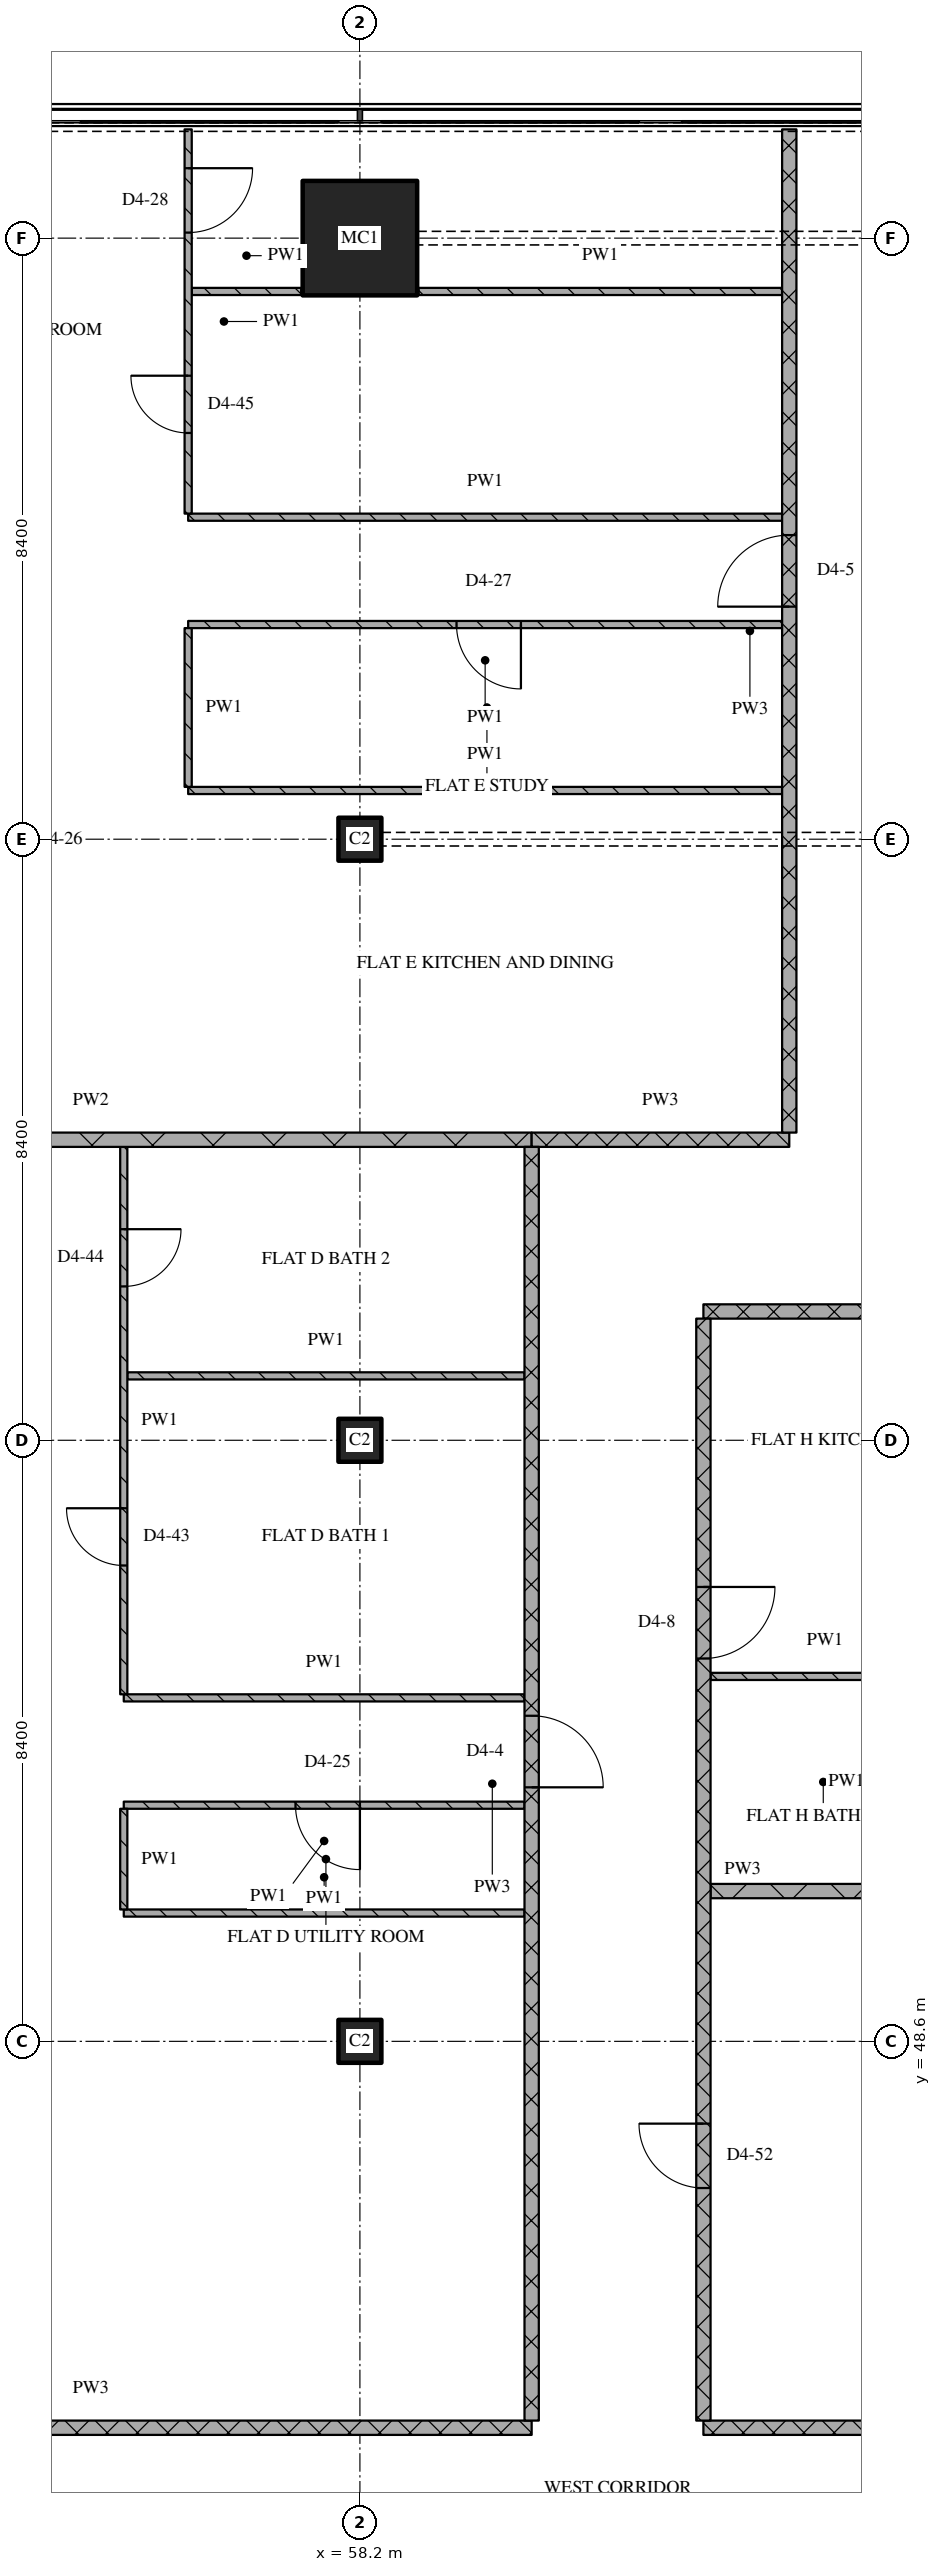
"""IFC4 building model, lengths in metres.
Left out: names, types, materials, properties, quantities, classifications, styles, units other than length and angle.
Written with IfcOpenShell. Run it as: python <this file> out.ifc"""

import sys

from ifc_helpers import new_model, si_unit, direction, frame, frame_2d, origin, origin_2d, place, context, subcontext, project, spatial, rectangle, extrude, element, fill, save


model = new_model("IFC4")
c1 = context("Model", 3, precision=1e-05, world=origin(), true_north=direction((0.0, 1.0)))
c2 = subcontext(c1, "Body", "Model", "MODEL_VIEW")
j1 = project(units=[si_unit("LENGTHUNIT", "METRE"), si_unit("PLANEANGLEUNIT", "RADIAN")], contexts=[c1])
p1 = place(None, origin())
s1 = spatial("IfcSite", under=j1, at=p1, CompositionType="ELEMENT")
p2 = place(p1, origin())
s2 = spatial("IfcBuilding", under=s1, at=p2, CompositionType="ELEMENT")
p3 = place(p2, frame((0.0, 0.0, 237.9)))
s3 = spatial("IfcBuildingStorey", under=s2, at=p3, CompositionType="ELEMENT", Elevation=237.9)
for number, where, z_axis, x_axis in (
    (1, (58.2, 48.6, 0.0), (0.0, 0.0, 1.0), (1.0, 0.0, 0.0)),
    (2, (58.2, 57.0, 0.0), (0.0, 0.0, 1.0), (1.0, 0.0, 0.0)),
    (3, (58.2, 65.4, 0.0), (0.0, 0.0, 1.0), (1.0, 0.0, 0.0)),
):
    element("IfcColumn", number, at=place(p3, frame(where, z_axis=z_axis, x_axis=x_axis)), inside=s3, PredefinedType="COLUMN", context=c2, shape_type="SweptSolid", body=[
        extrude(rectangle(XDim=0.6, YDim=0.6, at=origin_2d()), origin(), (0.0, 0.0, 1.0), 3.6),
    ])
p4 = place(p3, frame((58.2, 73.8, 0.0), z_axis=(0.0, 0.0, 1.0), x_axis=(1.0, 0.0, 0.0)))
e4 = element("IfcColumn", 4, at=p4, inside=s3, PredefinedType="COLUMN", context=c2, shape_type="SweptSolid", body=[
    extrude(rectangle(XDim=1.6, YDim=1.6, at=origin_2d()), origin(), (0.0, 0.0, 1.0), 3.6),
])
p5 = place(p3, frame((48.28, 43.2, 0.0), z_axis=(0.0, 0.0, 1.0), x_axis=(1.0, 0.0, 0.0)))
e5 = element("IfcWall", 5, at=p5, inside=s3, PredefinedType="PARTITIONING", context=c2, shape_type="SweptSolid", body=[
    extrude(rectangle(XDim=12.32, YDim=0.2, at=frame_2d((6.16, 0.0))), origin(), (0.0, 0.0, 1.0), 3.32),
])
p6 = place(p3, frame((63.0, 43.2, 0.0), z_axis=(0.0, 0.0, 1.0), x_axis=(1.0, 0.0, 0.0)))
e6 = element("IfcWall", 6, at=p6, inside=s3, PredefinedType="PARTITIONING", context=c2, shape_type="SweptSolid", body=[
    extrude(rectangle(XDim=5.2, YDim=0.2, at=frame_2d((2.6, 0.0))), origin(), (0.0, 0.0, 1.0), 3.32),
])
p7 = place(p3, frame((54.9, 50.393, 0.0), z_axis=(0.0, 0.0, 1.0), x_axis=(1.0, 0.0, 0.0)))
e7 = element("IfcWall", 7, at=p7, inside=s3, PredefinedType="PARTITIONING", context=c2, shape_type="SweptSolid", body=[
    extrude(rectangle(XDim=5.6, YDim=0.1, at=frame_2d((2.8, 0.0))), origin(), (0.0, 0.0, 1.0), 3.32),
])
p8 = place(p3, frame((63.1, 50.7, 0.0), z_axis=(0.0, 0.0, 1.0), x_axis=(1.0, 0.0, 0.0)))
e8 = element("IfcWall", 8, at=p8, inside=s3, PredefinedType="PARTITIONING", context=c2, shape_type="SweptSolid", body=[
    extrude(rectangle(XDim=5.1, YDim=0.2, at=frame_2d((2.55, 0.0))), origin(), (0.0, 0.0, 1.0), 3.32),
])
p9 = place(p3, frame((60.5, 51.9, 0.0), z_axis=(0.0, 0.0, 1.0), x_axis=(-1.0, 0.0, 0.0)))
e9 = element("IfcWall", 9, at=p9, inside=s3, PredefinedType="PARTITIONING", context=c2, shape_type="SweptSolid", body=[
    extrude(rectangle(XDim=5.6, YDim=0.1, at=frame_2d((2.8, 0.0))), origin(), (0.0, 0.0, 1.0), 3.32),
])
p10 = place(p9, frame((2.3, 0.0, 0.0)))
e10 = element("IfcOpeningElement", 10, at=p10, cuts=e9, PredefinedType="OPENING", context=c2, shape_type="SweptSolid", body=[
    extrude(rectangle(XDim=0.9, YDim=2.1, at=frame_2d((0.45, 1.05))), frame((0.0, 0.06, 0.0), z_axis=(0.0, -1.0, 0.0), x_axis=(1.0, 0.0, 0.0)), (0.0, 0.0, 1.0), 0.12),
])
p11 = place(p3, frame((54.9, 53.4, 0.0), z_axis=(0.0, 0.0, 1.0), x_axis=(1.0, 0.0, 0.0)))
e11 = element("IfcWall", 11, at=p11, inside=s3, PredefinedType="PARTITIONING", context=c2, shape_type="SweptSolid", body=[
    extrude(rectangle(XDim=5.6, YDim=0.1, at=frame_2d((2.8, 0.0))), origin(), (0.0, 0.0, 1.0), 3.32),
])
p12 = place(p3, frame((63.1, 53.7, 0.0), z_axis=(0.0, 0.0, 1.0), x_axis=(1.0, 0.0, 0.0)))
e12 = element("IfcWall", 12, at=p12, inside=s3, PredefinedType="PARTITIONING", context=c2, shape_type="SweptSolid", body=[
    extrude(rectangle(XDim=3.2, YDim=0.1, at=frame_2d((1.6, 0.0))), origin(), (0.0, 0.0, 1.0), 3.32),
])
p13 = place(p3, frame((54.95, 57.9, 0.0), z_axis=(0.0, 0.0, 1.0), x_axis=(1.0, 0.0, 0.0)))
e13 = element("IfcWall", 13, at=p13, inside=s3, PredefinedType="PARTITIONING", context=c2, shape_type="SweptSolid", body=[
    extrude(rectangle(XDim=5.55, YDim=0.1, at=frame_2d((2.775, 0.0))), origin(), (0.0, 0.0, 1.0), 3.32),
])
p14 = place(p3, frame((63.0, 58.8, 0.0), z_axis=(0.0, 0.0, 1.0), x_axis=(1.0, 0.0, 0.0)))
e14 = element("IfcWall", 14, at=p14, inside=s3, PredefinedType="PARTITIONING", context=c2, shape_type="SweptSolid", body=[
    extrude(rectangle(XDim=10.8, YDim=0.2, at=frame_2d((5.4, 0.0))), origin(), (0.0, 0.0, 1.0), 3.32),
])
p15 = place(p3, frame((60.6, 61.2, 0.0), z_axis=(0.0, 0.0, 1.0), x_axis=(1.0, 0.0, 0.0)))
e15 = element("IfcWall", 15, at=p15, inside=s3, PredefinedType="PARTITIONING", context=c2, shape_type="SweptSolid", body=[
    extrude(rectangle(XDim=3.6, YDim=0.2, at=frame_2d((1.8, 0.0))), origin(), (0.0, 0.0, 1.0), 3.32),
])
p16 = place(p3, frame((48.28, 61.2, 0.0), z_axis=(0.0, 0.0, 1.0), x_axis=(1.0, 0.0, 0.0)))
e16 = element("IfcWall", 16, at=p16, inside=s3, PredefinedType="PARTITIONING", context=c2, shape_type="SweptSolid", body=[
    extrude(rectangle(XDim=12.32, YDim=0.2, at=frame_2d((6.16, 0.0))), origin(), (0.0, 0.0, 1.0), 3.32),
])
p17 = place(p3, frame((55.8, 66.081, 0.0), z_axis=(0.0, 0.0, 1.0), x_axis=(1.0, 0.0, 0.0)))
e17 = element("IfcWall", 17, at=p17, inside=s3, PredefinedType="PARTITIONING", context=c2, shape_type="SweptSolid", body=[
    extrude(rectangle(XDim=8.3, YDim=0.1, at=frame_2d((4.15, 0.0))), origin(), (0.0, 0.0, 1.0), 3.32),
])
p18 = place(p3, frame((64.1, 68.4, 0.0), z_axis=(0.0, 0.0, 1.0), x_axis=(-1.0, 0.0, 0.0)))
e18 = element("IfcWall", 18, at=p18, inside=s3, PredefinedType="PARTITIONING", context=c2, shape_type="SweptSolid", body=[
    extrude(rectangle(XDim=8.3, YDim=0.1, at=frame_2d((4.15, 0.0))), origin(), (0.0, 0.0, 1.0), 3.32),
])
p19 = place(p18, frame((3.65, 0.0, 0.0)))
e19 = element("IfcOpeningElement", 19, at=p19, cuts=e18, PredefinedType="OPENING", context=c2, shape_type="SweptSolid", body=[
    extrude(rectangle(XDim=0.9, YDim=2.1, at=frame_2d((0.45, 1.05))), frame((0.0, 0.06, 0.0), z_axis=(0.0, -1.0, 0.0), x_axis=(1.0, 0.0, 0.0)), (0.0, 0.0, 1.0), 0.12),
])
p20 = place(p3, frame((55.8, 69.9, 0.0), z_axis=(0.0, 0.0, 1.0), x_axis=(1.0, 0.0, 0.0)))
e20 = element("IfcWall", 20, at=p20, inside=s3, PredefinedType="PARTITIONING", context=c2, shape_type="SweptSolid", body=[
    extrude(rectangle(XDim=8.3, YDim=0.1, at=frame_2d((4.15, 0.0))), origin(), (0.0, 0.0, 1.0), 3.32),
])
p21 = place(p3, frame((55.85, 73.055, 0.0), z_axis=(0.0, 0.0, 1.0), x_axis=(1.0, 0.0, 0.0)))
e21 = element("IfcWall", 21, at=p21, inside=s3, PredefinedType="PARTITIONING", context=c2, shape_type="SweptSolid", body=[
    extrude(rectangle(XDim=1.53, YDim=0.1, at=frame_2d((0.765, 0.0))), origin(), (0.0, 0.0, 1.0), 3.32),
])
p22 = place(p3, frame((59.02, 73.055, 0.0), z_axis=(0.0, 0.0, 1.0), x_axis=(1.0, 0.0, 0.0)))
e22 = element("IfcWall", 22, at=p22, inside=s3, PredefinedType="PARTITIONING", context=c2, shape_type="SweptSolid", body=[
    extrude(rectangle(XDim=5.08, YDim=0.1, at=frame_2d((2.54, 0.0))), origin(), (0.0, 0.0, 1.0), 3.32),
])
p23 = place(p3, frame((54.9, 51.85, 0.0), z_axis=(0.0, 0.0, 1.0), x_axis=(0.0, -1.0, 0.0)))
e23 = element("IfcWall", 23, at=p23, inside=s3, PredefinedType="PARTITIONING", context=c2, shape_type="SweptSolid", body=[
    extrude(rectangle(XDim=1.407, YDim=0.1, at=frame_2d((0.704, 0.0))), origin(), (0.0, 0.0, 1.0), 3.32),
])
p24 = place(p3, frame((54.9, 61.1, 0.0), z_axis=(0.0, 0.0, 1.0), x_axis=(0.0, -1.0, 0.0)))
e24 = element("IfcWall", 24, at=p24, inside=s3, PredefinedType="PARTITIONING", context=c2, shape_type="SweptSolid", body=[
    extrude(rectangle(XDim=7.65, YDim=0.1, at=frame_2d((3.825, 0.0))), origin(), (0.0, 0.0, 1.0), 3.32),
])
p25 = place(p24, frame((1.15, 0.0, 0.0)))
e25 = element("IfcOpeningElement", 25, at=p25, cuts=e24, PredefinedType="OPENING", context=c2, shape_type="SweptSolid", body=[
    extrude(rectangle(XDim=0.8, YDim=2.1, at=frame_2d((0.4, 1.05))), frame((0.0, 0.06, 0.0), z_axis=(0.0, -1.0, 0.0), x_axis=(1.0, 0.0, 0.0)), (0.0, 0.0, 1.0), 0.12),
])
p26 = place(p24, frame((5.05, 0.0, 0.0)))
e26 = element("IfcOpeningElement", 26, at=p26, cuts=e24, PredefinedType="OPENING", context=c2, shape_type="SweptSolid", body=[
    extrude(rectangle(XDim=0.8, YDim=2.1, at=frame_2d((0.4, 1.05))), frame((0.0, 0.06, 0.0), z_axis=(0.0, -1.0, 0.0), x_axis=(1.0, 0.0, 0.0)), (0.0, 0.0, 1.0), 0.12),
])
p27 = place(p3, frame((55.8, 68.35, 0.0), z_axis=(0.0, 0.0, 1.0), x_axis=(0.0, -1.0, 0.0)))
e27 = element("IfcWall", 27, at=p27, inside=s3, PredefinedType="PARTITIONING", context=c2, shape_type="SweptSolid", body=[
    extrude(rectangle(XDim=2.219, YDim=0.1, at=frame_2d((1.109, 0.0))), origin(), (0.0, 0.0, 1.0), 3.32),
])
p28 = place(p3, frame((55.8, 75.32, 0.0), z_axis=(0.0, 0.0, 1.0), x_axis=(0.0, -1.0, 0.0)))
e28 = element("IfcWall", 28, at=p28, inside=s3, PredefinedType="PARTITIONING", context=c2, shape_type="SweptSolid", body=[
    extrude(rectangle(XDim=5.37, YDim=0.1, at=frame_2d((2.685, 0.0))), origin(), (0.0, 0.0, 1.0), 3.32),
])
p29 = place(p28, frame((0.542, 0.0, 0.0)))
e29 = element("IfcOpeningElement", 29, at=p29, cuts=e28, PredefinedType="OPENING", context=c2, shape_type="SweptSolid", body=[
    extrude(rectangle(XDim=0.9, YDim=2.1, at=frame_2d((0.45, 1.05))), frame((0.0, 0.06, 0.0), z_axis=(0.0, -1.0, 0.0), x_axis=(1.0, 0.0, 0.0)), (0.0, 0.0, 1.0), 0.12),
])
p30 = place(p28, frame((3.443, 0.0, 0.0)))
e30 = element("IfcOpeningElement", 30, at=p30, cuts=e28, PredefinedType="OPENING", context=c2, shape_type="SweptSolid", body=[
    extrude(rectangle(XDim=0.8, YDim=2.1, at=frame_2d((0.4, 1.05))), frame((0.0, 0.06, 0.0), z_axis=(0.0, -1.0, 0.0), x_axis=(1.0, 0.0, 0.0)), (0.0, 0.0, 1.0), 0.12),
])
p31 = place(p3, frame((60.6, 43.3, 0.0), z_axis=(0.0, 0.0, 1.0), x_axis=(0.0, 1.0, 0.0)))
e31 = element("IfcWall", 31, at=p31, inside=s3, PredefinedType="PARTITIONING", context=c2, shape_type="SweptSolid", body=[
    extrude(rectangle(XDim=17.8, YDim=0.2, at=frame_2d((8.9, 0.0))), origin(), (0.0, 0.0, 1.0), 3.32),
])
p32 = place(p31, frame((8.85, 0.0, 0.0)))
e32 = element("IfcOpeningElement", 32, at=p32, cuts=e31, PredefinedType="OPENING", context=c2, shape_type="SweptSolid", body=[
    extrude(rectangle(XDim=1.0, YDim=2.1, at=frame_2d((0.5, 1.05))), frame((0.0, 0.11, 0.0), z_axis=(0.0, -1.0, 0.0), x_axis=(1.0, 0.0, 0.0)), (0.0, 0.0, 1.0), 0.22),
])
p33 = place(p3, frame((63.0, 58.7, 0.0), z_axis=(0.0, 0.0, 1.0), x_axis=(0.0, -1.0, 0.0)))
e33 = element("IfcWall", 33, at=p33, inside=s3, PredefinedType="PARTITIONING", context=c2, shape_type="SweptSolid", body=[
    extrude(rectangle(XDim=15.4, YDim=0.2, at=frame_2d((7.7, 0.0))), origin(), (0.0, 0.0, 1.0), 3.32),
])
p34 = place(p33, frame((3.75, 0.0, 0.0)))
e34 = element("IfcOpeningElement", 34, at=p34, cuts=e33, PredefinedType="OPENING", context=c2, shape_type="SweptSolid", body=[
    extrude(rectangle(XDim=1.0, YDim=2.1, at=frame_2d((0.5, 1.05))), frame((0.0, 0.11, 0.0), z_axis=(0.0, -1.0, 0.0), x_axis=(1.0, 0.0, 0.0)), (0.0, 0.0, 1.0), 0.22),
])
p35 = place(p33, frame((11.25, 0.0, 0.0)))
e35 = element("IfcOpeningElement", 35, at=p35, cuts=e33, PredefinedType="OPENING", context=c2, shape_type="SweptSolid", body=[
    extrude(rectangle(XDim=0.9, YDim=2.1, at=frame_2d((0.45, 1.05))), frame((0.0, 0.11, 0.0), z_axis=(0.0, -1.0, 0.0), x_axis=(1.0, 0.0, 0.0)), (0.0, 0.0, 1.0), 0.22),
])
p36 = place(p3, frame((64.2, 61.3, 0.0), z_axis=(0.0, 0.0, 1.0), x_axis=(0.0, 1.0, 0.0)))
e36 = element("IfcWall", 36, at=p36, inside=s3, PredefinedType="PARTITIONING", context=c2, shape_type="SweptSolid", body=[
    extrude(rectangle(XDim=14.02, YDim=0.2, at=frame_2d((7.01, 0.0))), origin(), (0.0, 0.0, 1.0), 3.32),
])
p37 = place(p36, frame((7.35, 0.0, 0.0)))
e37 = element("IfcOpeningElement", 37, at=p37, cuts=e36, PredefinedType="OPENING", context=c2, shape_type="SweptSolid", body=[
    extrude(rectangle(XDim=1.0, YDim=2.1, at=frame_2d((0.5, 1.05))), frame((0.0, 0.11, 0.0), z_axis=(0.0, -1.0, 0.0), x_axis=(1.0, 0.0, 0.0)), (0.0, 0.0, 1.0), 0.22),
])
p38 = place(p10, origin())
e38 = element("IfcDoor", 38, at=p38, inside=s3, OperationType="SINGLE_SWING_LEFT", PredefinedType="DOOR", context=c2, shape_type="SweptSolid", body=[
    extrude(rectangle(XDim=0.9, YDim=2.1, at=frame_2d((0.45, 1.05))), frame((0.0, 0.025, 0.0), z_axis=(0.0, -1.0, 0.0), x_axis=(1.0, 0.0, 0.0)), (0.0, 0.0, 1.0), 0.05),
])
fill(e10, e38)
p39 = place(p19, origin())
e39 = element("IfcDoor", 39, at=p39, inside=s3, OperationType="SINGLE_SWING_LEFT", PredefinedType="DOOR", context=c2, shape_type="SweptSolid", body=[
    extrude(rectangle(XDim=0.9, YDim=2.1, at=frame_2d((0.45, 1.05))), frame((0.0, 0.025, 0.0), z_axis=(0.0, -1.0, 0.0), x_axis=(1.0, 0.0, 0.0)), (0.0, 0.0, 1.0), 0.05),
])
fill(e19, e39)
p40 = place(p25, origin())
e40 = element("IfcDoor", 40, at=p40, inside=s3, OperationType="SINGLE_SWING_LEFT", PredefinedType="DOOR", context=c2, shape_type="SweptSolid", body=[
    extrude(rectangle(XDim=0.8, YDim=2.1, at=frame_2d((0.4, 1.05))), frame((0.0, 0.025, 0.0), z_axis=(0.0, -1.0, 0.0), x_axis=(1.0, 0.0, 0.0)), (0.0, 0.0, 1.0), 0.05),
])
fill(e25, e40)
p41 = place(p26, origin())
e41 = element("IfcDoor", 41, at=p41, inside=s3, OperationType="SINGLE_SWING_RIGHT", PredefinedType="DOOR", context=c2, shape_type="SweptSolid", body=[
    extrude(rectangle(XDim=0.8, YDim=2.1, at=frame_2d((0.4, 1.05))), frame((0.0, 0.025, 0.0), z_axis=(0.0, -1.0, 0.0), x_axis=(1.0, 0.0, 0.0)), (0.0, 0.0, 1.0), 0.05),
])
fill(e26, e41)
p42 = place(p29, origin())
e42 = element("IfcDoor", 42, at=p42, inside=s3, OperationType="SINGLE_SWING_LEFT", PredefinedType="DOOR", context=c2, shape_type="SweptSolid", body=[
    extrude(rectangle(XDim=0.9, YDim=2.1, at=frame_2d((0.45, 1.05))), frame((0.0, 0.025, 0.0), z_axis=(0.0, -1.0, 0.0), x_axis=(1.0, 0.0, 0.0)), (0.0, 0.0, 1.0), 0.05),
])
fill(e29, e42)
p43 = place(p30, origin())
e43 = element("IfcDoor", 43, at=p43, inside=s3, OperationType="SINGLE_SWING_RIGHT", PredefinedType="DOOR", context=c2, shape_type="SweptSolid", body=[
    extrude(rectangle(XDim=0.8, YDim=2.1, at=frame_2d((0.4, 1.05))), frame((0.0, 0.025, 0.0), z_axis=(0.0, -1.0, 0.0), x_axis=(1.0, 0.0, 0.0)), (0.0, 0.0, 1.0), 0.05),
])
fill(e30, e43)
p44 = place(p32, origin())
e44 = element("IfcDoor", 44, at=p44, inside=s3, OperationType="SINGLE_SWING_RIGHT", PredefinedType="DOOR", context=c2, shape_type="SweptSolid", body=[
    extrude(rectangle(XDim=1.0, YDim=2.1, at=frame_2d((0.5, 1.05))), frame((0.0, 0.025, 0.0), z_axis=(0.0, -1.0, 0.0), x_axis=(1.0, 0.0, 0.0)), (0.0, 0.0, 1.0), 0.05),
])
fill(e32, e44)
p45 = place(p34, origin())
e45 = element("IfcDoor", 45, at=p45, inside=s3, OperationType="SINGLE_SWING_LEFT", PredefinedType="DOOR", context=c2, shape_type="SweptSolid", body=[
    extrude(rectangle(XDim=1.0, YDim=2.1, at=frame_2d((0.5, 1.05))), frame((0.0, 0.025, 0.0), z_axis=(0.0, -1.0, 0.0), x_axis=(1.0, 0.0, 0.0)), (0.0, 0.0, 1.0), 0.05),
])
fill(e34, e45)
p46 = place(p35, origin())
e46 = element("IfcDoor", 46, at=p46, inside=s3, OperationType="SINGLE_SWING_RIGHT", PredefinedType="DOOR", context=c2, shape_type="SweptSolid", body=[
    extrude(rectangle(XDim=0.9, YDim=2.1, at=frame_2d((0.45, 1.05))), frame((0.0, 0.025, 0.0), z_axis=(0.0, -1.0, 0.0), x_axis=(1.0, 0.0, 0.0)), (0.0, 0.0, 1.0), 0.05),
])
fill(e35, e46)
p47 = place(p37, origin())
e47 = element("IfcDoor", 47, at=p47, inside=s3, OperationType="SINGLE_SWING_LEFT", PredefinedType="DOOR", context=c2, shape_type="SweptSolid", body=[
    extrude(rectangle(XDim=1.0, YDim=2.1, at=frame_2d((0.5, 1.05))), frame((0.0, 0.025, 0.0), z_axis=(0.0, -1.0, 0.0), x_axis=(1.0, 0.0, 0.0)), (0.0, 0.0, 1.0), 0.05),
])
fill(e37, e47)
save(model, sys.argv[1])
